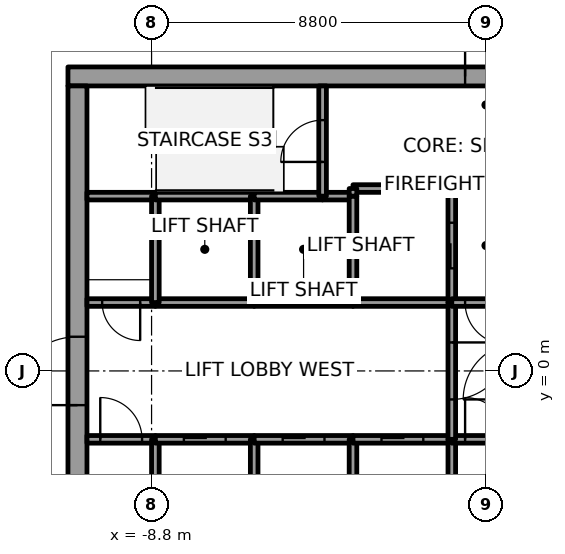
"""IFC4 building model, lengths in metres.
Left out: names, types, materials, properties, quantities, classifications, styles, units other than length and angle.
Written with IfcOpenShell. Run it as: python <this file> out.ifc"""

import sys

from ifc_helpers import new_model, si_unit, direction, frame, frame_2d, origin, place, context, subcontext, project, spatial, rectangle, extrude, element, fill, save


model = new_model("IFC4")
c1 = context("Model", 3, precision=1e-05, world=origin(), true_north=direction((0.0, 1.0)))
c2 = subcontext(c1, "Body", "Model", "MODEL_VIEW")
j1 = project(units=[si_unit("LENGTHUNIT", "METRE"), si_unit("PLANEANGLEUNIT", "RADIAN")], contexts=[c1])
p1 = place(None, origin())
s1 = spatial("IfcSite", under=j1, at=p1, CompositionType="ELEMENT")
p2 = place(p1, origin())
s2 = spatial("IfcBuilding", under=s1, at=p2, CompositionType="ELEMENT")
p3 = place(p2, frame((0.0, 0.0, 161.8)))
s3 = spatial("IfcBuildingStorey", under=s2, at=p3, CompositionType="ELEMENT", Elevation=161.8)
p4 = place(p3, frame((-11.0, 7.75, 0.0), z_axis=(0.0, 0.0, 1.0), x_axis=(1.0, 0.0, 0.0)))
e1 = element("IfcWall", 1, at=p4, inside=s3, PredefinedType="SHEAR", context=c2, shape_type="SweptSolid", body=[
    extrude(rectangle(XDim=22.0, YDim=0.5, at=frame_2d((11.0, 0.0))), origin(), (0.0, 0.0, 1.0), 4.0),
])
p5 = place(p4, frame((10.45, 0.0, 0.0)))
e2 = element("IfcOpeningElement", 2, at=p5, cuts=e1, PredefinedType="OPENING", context=c2, shape_type="SweptSolid", body=[
    extrude(rectangle(XDim=1.1, YDim=2.1, at=frame_2d((0.55, 1.05))), frame((0.0, 0.25, 0.0), z_axis=(0.0, -1.0, 0.0), x_axis=(1.0, 0.0, 0.0)), (0.0, 0.0, 1.0), 0.5),
])
p6 = place(p3, frame((-10.75, -7.5, 0.0), z_axis=(0.0, 0.0, 1.0), x_axis=(0.0, 1.0, 0.0)))
e3 = element("IfcWall", 3, at=p6, inside=s3, PredefinedType="SHEAR", context=c2, shape_type="SweptSolid", body=[
    extrude(rectangle(XDim=15.0, YDim=0.5, at=frame_2d((7.5, 0.0))), origin(), (0.0, 0.0, 1.0), 4.0),
])
p7 = place(p6, frame((6.6, 0.0, 0.0)))
e4 = element("IfcOpeningElement", 4, at=p7, cuts=e3, PredefinedType="OPENING", context=c2, shape_type="SweptSolid", body=[
    extrude(rectangle(XDim=1.8, YDim=2.1, at=frame_2d((0.9, 1.05))), frame((0.0, 0.25, 0.0), z_axis=(0.0, -1.0, 0.0), x_axis=(1.0, 0.0, 0.0)), (0.0, 0.0, 1.0), 0.5),
])
p8 = place(p3, frame((-10.5, -1.8, 0.0), z_axis=(0.0, 0.0, 1.0), x_axis=(1.0, 0.0, 0.0)))
e5 = element("IfcWall", 5, at=p8, inside=s3, PredefinedType="SOLIDWALL", context=c2, shape_type="SweptSolid", body=[
    extrude(rectangle(XDim=1.8, YDim=0.2, at=frame_2d((0.9, 0.0))), origin(), (0.0, 0.0, 1.0), 3.85),
])
p9 = place(p8, frame((0.35, 0.0, 0.0)))
e6 = element("IfcOpeningElement", 6, at=p9, cuts=e5, PredefinedType="OPENING", context=c2, shape_type="SweptSolid", body=[
    extrude(rectangle(XDim=1.1, YDim=2.1, at=frame_2d((0.55, 1.05))), frame((0.0, 0.1, 0.0), z_axis=(0.0, -1.0, 0.0), x_axis=(1.0, 0.0, 0.0)), (0.0, 0.0, 1.0), 0.2),
])
p10 = place(p3, frame((-8.7, 1.8, 0.0), z_axis=(0.0, 0.0, 1.0), x_axis=(-1.0, 0.0, 0.0)))
e7 = element("IfcWall", 7, at=p10, inside=s3, PredefinedType="SOLIDWALL", context=c2, shape_type="SweptSolid", body=[
    extrude(rectangle(XDim=1.8, YDim=0.2, at=frame_2d((0.9, 0.0))), origin(), (0.0, 0.0, 1.0), 3.85),
])
p11 = place(p10, frame((0.4, 0.0, 0.0)))
e8 = element("IfcOpeningElement", 8, at=p11, cuts=e7, PredefinedType="OPENING", context=c2, shape_type="SweptSolid", body=[
    extrude(rectangle(XDim=1.0, YDim=2.1, at=frame_2d((0.5, 1.05))), frame((0.0, 0.1, 0.0), z_axis=(0.0, -1.0, 0.0), x_axis=(1.0, 0.0, 0.0)), (0.0, 0.0, 1.0), 0.2),
])
p12 = place(p3, frame((-8.7, 4.6, 0.0), z_axis=(0.0, 0.0, 1.0), x_axis=(-1.0, 0.0, 0.0)))
e9 = element("IfcWall", 9, at=p12, inside=s3, PredefinedType="SOLIDWALL", context=c2, shape_type="SweptSolid", body=[
    extrude(rectangle(XDim=1.8, YDim=0.2, at=frame_2d((0.9, 0.0))), origin(), (0.0, 0.0, 1.0), 3.85),
])
p13 = place(p3, frame((-8.7, -4.6, 0.0), z_axis=(0.0, 0.0, 1.0), x_axis=(0.0, 1.0, 0.0)))
e10 = element("IfcWall", 10, at=p13, inside=s3, PredefinedType="SOLIDWALL", context=c2, shape_type="SweptSolid", body=[
    extrude(rectangle(XDim=2.8, YDim=0.2, at=frame_2d((1.4, 0.0))), origin(), (0.0, 0.0, 1.0), 3.85),
])
p14 = place(p3, frame((-8.7, -1.8, 0.0), z_axis=(0.0, 0.0, 1.0), x_axis=(1.0, 0.0, 0.0)))
e11 = element("IfcWall", 11, at=p14, inside=s3, PredefinedType="SOLIDWALL", context=c2, shape_type="SweptSolid", body=[
    extrude(rectangle(XDim=2.6, YDim=0.2, at=frame_2d((1.3, 0.0))), origin(), (0.0, 0.0, 1.0), 3.85),
])
p15 = place(p14, frame((0.75, 0.0, 0.0)))
e12 = element("IfcOpeningElement", 12, at=p15, cuts=e11, PredefinedType="OPENING", context=c2, shape_type="SweptSolid", body=[
    extrude(rectangle(XDim=1.1, YDim=2.1, at=frame_2d((0.55, 1.05))), frame((0.0, 0.1, 0.0), z_axis=(0.0, -1.0, 0.0), x_axis=(1.0, 0.0, 0.0)), (0.0, 0.0, 1.0), 0.2),
])
p16 = place(p3, frame((-6.1, 1.8, 0.0), z_axis=(0.0, 0.0, 1.0), x_axis=(-1.0, 0.0, 0.0)))
e13 = element("IfcWall", 13, at=p16, inside=s3, PredefinedType="SOLIDWALL", context=c2, shape_type="SweptSolid", body=[
    extrude(rectangle(XDim=2.6, YDim=0.2, at=frame_2d((1.3, 0.0))), origin(), (0.0, 0.0, 1.0), 3.85),
])
p17 = place(p3, frame((-8.7, 1.8, 0.0), z_axis=(0.0, 0.0, 1.0), x_axis=(0.0, 1.0, 0.0)))
e14 = element("IfcWall", 14, at=p17, inside=s3, PredefinedType="SOLIDWALL", context=c2, shape_type="SweptSolid", body=[
    extrude(rectangle(XDim=2.8, YDim=0.2, at=frame_2d((1.4, 0.0))), origin(), (0.0, 0.0, 1.0), 3.85),
])
p18 = place(p3, frame((-6.1, 4.6, 0.0), z_axis=(0.0, 0.0, 1.0), x_axis=(-1.0, 0.0, 0.0)))
e15 = element("IfcWall", 15, at=p18, inside=s3, PredefinedType="SOLIDWALL", context=c2, shape_type="SweptSolid", body=[
    extrude(rectangle(XDim=2.6, YDim=0.2, at=frame_2d((1.3, 0.0))), origin(), (0.0, 0.0, 1.0), 3.85),
])
p19 = place(p3, frame((-6.1, -4.6, 0.0), z_axis=(0.0, 0.0, 1.0), x_axis=(0.0, 1.0, 0.0)))
e16 = element("IfcWall", 16, at=p19, inside=s3, PredefinedType="SOLIDWALL", context=c2, shape_type="SweptSolid", body=[
    extrude(rectangle(XDim=2.8, YDim=0.2, at=frame_2d((1.4, 0.0))), origin(), (0.0, 0.0, 1.0), 3.85),
])
p20 = place(p3, frame((-6.1, -1.8, 0.0), z_axis=(0.0, 0.0, 1.0), x_axis=(1.0, 0.0, 0.0)))
e17 = element("IfcWall", 17, at=p20, inside=s3, PredefinedType="SOLIDWALL", context=c2, shape_type="SweptSolid", body=[
    extrude(rectangle(XDim=2.6, YDim=0.2, at=frame_2d((1.3, 0.0))), origin(), (0.0, 0.0, 1.0), 3.85),
])
p21 = place(p20, frame((0.75, 0.0, 0.0)))
e18 = element("IfcOpeningElement", 18, at=p21, cuts=e17, PredefinedType="OPENING", context=c2, shape_type="SweptSolid", body=[
    extrude(rectangle(XDim=1.1, YDim=2.1, at=frame_2d((0.55, 1.05))), frame((0.0, 0.1, 0.0), z_axis=(0.0, -1.0, 0.0), x_axis=(1.0, 0.0, 0.0)), (0.0, 0.0, 1.0), 0.2),
])
p22 = place(p3, frame((-3.5, 1.8, 0.0), z_axis=(0.0, 0.0, 1.0), x_axis=(-1.0, 0.0, 0.0)))
e19 = element("IfcWall", 19, at=p22, inside=s3, PredefinedType="SOLIDWALL", context=c2, shape_type="SweptSolid", body=[
    extrude(rectangle(XDim=2.6, YDim=0.2, at=frame_2d((1.3, 0.0))), origin(), (0.0, 0.0, 1.0), 3.85),
])
p23 = place(p3, frame((-6.1, 1.8, 0.0), z_axis=(0.0, 0.0, 1.0), x_axis=(0.0, 1.0, 0.0)))
e20 = element("IfcWall", 20, at=p23, inside=s3, PredefinedType="SOLIDWALL", context=c2, shape_type="SweptSolid", body=[
    extrude(rectangle(XDim=2.8, YDim=0.2, at=frame_2d((1.4, 0.0))), origin(), (0.0, 0.0, 1.0), 3.85),
])
p24 = place(p3, frame((-4.3, 4.6, 0.0), z_axis=(0.0, 0.0, 1.0), x_axis=(-1.0, 0.0, 0.0)))
e21 = element("IfcWall", 21, at=p24, inside=s3, PredefinedType="SOLIDWALL", context=c2, shape_type="SweptSolid", body=[
    extrude(rectangle(XDim=1.8, YDim=0.2, at=frame_2d((0.9, 0.0))), origin(), (0.0, 0.0, 1.0), 3.85),
])
p25 = place(p3, frame((-3.5, 4.6, 0.0), z_axis=(0.0, 0.0, 1.0), x_axis=(-1.0, 0.0, 0.0)))
e22 = element("IfcWall", 22, at=p25, inside=s3, PredefinedType="SOLIDWALL", context=c2, shape_type="SweptSolid", body=[
    extrude(rectangle(XDim=0.8, YDim=0.2, at=frame_2d((0.4, 0.0))), origin(), (0.0, 0.0, 1.0), 3.85),
])
p26 = place(p3, frame((-4.3, 4.6, 0.0), z_axis=(0.0, 0.0, 1.0), x_axis=(0.0, 1.0, 0.0)))
e23 = element("IfcWall", 23, at=p26, inside=s3, PredefinedType="SOLIDWALL", context=c2, shape_type="SweptSolid", body=[
    extrude(rectangle(XDim=2.9, YDim=0.2, at=frame_2d((1.45, 0.0))), origin(), (0.0, 0.0, 1.0), 3.85),
])
p27 = place(p26, frame((0.9, 0.0, 0.0)))
e24 = element("IfcOpeningElement", 24, at=p27, cuts=e23, PredefinedType="OPENING", context=c2, shape_type="SweptSolid", body=[
    extrude(rectangle(XDim=1.1, YDim=2.1, at=frame_2d((0.55, 1.05))), frame((0.0, 0.1, 0.0), z_axis=(0.0, -1.0, 0.0), x_axis=(1.0, 0.0, 0.0)), (0.0, 0.0, 1.0), 0.2),
])
p28 = place(p3, frame((-3.5, -4.6, 0.0), z_axis=(0.0, 0.0, 1.0), x_axis=(0.0, 1.0, 0.0)))
e25 = element("IfcWall", 25, at=p28, inside=s3, PredefinedType="SOLIDWALL", context=c2, shape_type="SweptSolid", body=[
    extrude(rectangle(XDim=2.8, YDim=0.2, at=frame_2d((1.4, 0.0))), origin(), (0.0, 0.0, 1.0), 3.85),
])
p29 = place(p3, frame((-3.5, -1.8, 0.0), z_axis=(0.0, 0.0, 1.0), x_axis=(1.0, 0.0, 0.0)))
e26 = element("IfcWall", 26, at=p29, inside=s3, PredefinedType="SOLIDWALL", context=c2, shape_type="SweptSolid", body=[
    extrude(rectangle(XDim=2.6, YDim=0.2, at=frame_2d((1.3, 0.0))), origin(), (0.0, 0.0, 1.0), 3.85),
])
p30 = place(p29, frame((0.75, 0.0, 0.0)))
e27 = element("IfcOpeningElement", 27, at=p30, cuts=e26, PredefinedType="OPENING", context=c2, shape_type="SweptSolid", body=[
    extrude(rectangle(XDim=1.1, YDim=2.1, at=frame_2d((0.55, 1.05))), frame((0.0, 0.1, 0.0), z_axis=(0.0, -1.0, 0.0), x_axis=(1.0, 0.0, 0.0)), (0.0, 0.0, 1.0), 0.2),
])
p31 = place(p3, frame((-0.9, 1.8, 0.0), z_axis=(0.0, 0.0, 1.0), x_axis=(-1.0, 0.0, 0.0)))
e28 = element("IfcWall", 28, at=p31, inside=s3, PredefinedType="SOLIDWALL", context=c2, shape_type="SweptSolid", body=[
    extrude(rectangle(XDim=2.6, YDim=0.2, at=frame_2d((1.3, 0.0))), origin(), (0.0, 0.0, 1.0), 3.85),
])
p32 = place(p3, frame((-3.5, 4.6, 0.0), z_axis=(0.0, 0.0, 1.0), x_axis=(0.0, -1.0, 0.0)))
e29 = element("IfcWall", 29, at=p32, inside=s3, PredefinedType="SOLIDWALL", context=c2, shape_type="SweptSolid", body=[
    extrude(rectangle(XDim=2.8, YDim=0.2, at=frame_2d((1.4, 0.0))), origin(), (0.0, 0.0, 1.0), 3.85),
])
p33 = place(p3, frame((-0.9, 1.8, 0.0), z_axis=(0.0, 0.0, 1.0), x_axis=(0.0, 1.0, 0.0)))
e30 = element("IfcWall", 30, at=p33, inside=s3, PredefinedType="SOLIDWALL", context=c2, shape_type="SweptSolid", body=[
    extrude(rectangle(XDim=3.0, YDim=0.2, at=frame_2d((1.5, 0.0))), origin(), (0.0, 0.0, 1.0), 3.85),
])
p34 = place(p33, frame((0.9, 0.0, 0.0)))
e31 = element("IfcOpeningElement", 31, at=p34, cuts=e30, PredefinedType="OPENING", context=c2, shape_type="SweptSolid", body=[
    extrude(rectangle(XDim=1.2, YDim=2.1, at=frame_2d((0.6, 1.05))), frame((0.0, 0.1, 0.0), z_axis=(0.0, -1.0, 0.0), x_axis=(1.0, 0.0, 0.0)), (0.0, 0.0, 1.0), 0.2),
])
p35 = place(p3, frame((-0.9, 4.8, 0.0), z_axis=(0.0, 0.0, 1.0), x_axis=(-1.0, 0.0, 0.0)))
e32 = element("IfcWall", 32, at=p35, inside=s3, PredefinedType="SOLIDWALL", context=c2, shape_type="SweptSolid", body=[
    extrude(rectangle(XDim=2.6, YDim=0.2, at=frame_2d((1.3, 0.0))), origin(), (0.0, 0.0, 1.0), 3.85),
])
p36 = place(p3, frame((-3.5, 4.8, 0.0), z_axis=(0.0, 0.0, 1.0), x_axis=(0.0, -1.0, 0.0)))
e33 = element("IfcWall", 33, at=p36, inside=s3, PredefinedType="SOLIDWALL", context=c2, shape_type="SweptSolid", body=[
    extrude(rectangle(XDim=0.2, YDim=0.2, at=frame_2d((0.1, 0.0))), origin(), (0.0, 0.0, 1.0), 3.85),
])
p37 = place(p3, frame((-0.9, -4.6, 0.0), z_axis=(0.0, 0.0, 1.0), x_axis=(0.0, 1.0, 0.0)))
e34 = element("IfcWall", 34, at=p37, inside=s3, PredefinedType="SOLIDWALL", context=c2, shape_type="SweptSolid", body=[
    extrude(rectangle(XDim=2.8, YDim=0.2, at=frame_2d((1.4, 0.0))), origin(), (0.0, 0.0, 1.0), 3.85),
])
p38 = place(p3, frame((-0.9, -1.8, 0.0), z_axis=(0.0, 0.0, 1.0), x_axis=(1.0, 0.0, 0.0)))
e35 = element("IfcWall", 35, at=p38, inside=s3, PredefinedType="SOLIDWALL", context=c2, shape_type="SweptSolid", body=[
    extrude(rectangle(XDim=1.8, YDim=0.2, at=frame_2d((0.9, 0.0))), origin(), (0.0, 0.0, 1.0), 3.85),
])
p39 = place(p38, frame((0.35, 0.0, 0.0)))
e36 = element("IfcOpeningElement", 36, at=p39, cuts=e35, PredefinedType="OPENING", context=c2, shape_type="SweptSolid", body=[
    extrude(rectangle(XDim=1.1, YDim=2.1, at=frame_2d((0.55, 1.05))), frame((0.0, 0.1, 0.0), z_axis=(0.0, -1.0, 0.0), x_axis=(1.0, 0.0, 0.0)), (0.0, 0.0, 1.0), 0.2),
])
p40 = place(p3, frame((-0.9, 1.8, 0.0), z_axis=(0.0, 0.0, 1.0), x_axis=(0.0, -1.0, 0.0)))
e37 = element("IfcWall", 37, at=p40, inside=s3, PredefinedType="SOLIDWALL", context=c2, shape_type="SweptSolid", body=[
    extrude(rectangle(XDim=3.6, YDim=0.2, at=frame_2d((1.8, 0.0))), origin(), (0.0, 0.0, 1.0), 3.85),
])
p41 = place(p40, frame((1.05, 0.0, 0.0)))
e38 = element("IfcOpeningElement", 38, at=p41, cuts=e37, PredefinedType="OPENING", context=c2, shape_type="SweptSolid", body=[
    extrude(rectangle(XDim=1.5, YDim=2.1, at=frame_2d((0.75, 1.05))), frame((0.0, 0.1, 0.0), z_axis=(0.0, -1.0, 0.0), x_axis=(1.0, 0.0, 0.0)), (0.0, 0.0, 1.0), 0.2),
])
p42 = place(p3, frame((0.9, 1.8, 0.0), z_axis=(0.0, 0.0, 1.0), x_axis=(-1.0, 0.0, 0.0)))
e39 = element("IfcWall", 39, at=p42, inside=s3, PredefinedType="SOLIDWALL", context=c2, shape_type="SweptSolid", body=[
    extrude(rectangle(XDim=1.8, YDim=0.2, at=frame_2d((0.9, 0.0))), origin(), (0.0, 0.0, 1.0), 3.85),
])
p43 = place(p42, frame((0.35, 0.0, 0.0)))
e40 = element("IfcOpeningElement", 40, at=p43, cuts=e39, PredefinedType="OPENING", context=c2, shape_type="SweptSolid", body=[
    extrude(rectangle(XDim=1.1, YDim=2.1, at=frame_2d((0.55, 1.05))), frame((0.0, 0.1, 0.0), z_axis=(0.0, -1.0, 0.0), x_axis=(1.0, 0.0, 0.0)), (0.0, 0.0, 1.0), 0.2),
])
p44 = place(p15, origin())
e41 = element("IfcDoor", 41, at=p44, inside=s3, OperationType="SLIDING_TO_RIGHT", PredefinedType="DOOR", context=c2, shape_type="SweptSolid", body=[
    extrude(rectangle(XDim=1.1, YDim=2.1, at=frame_2d((0.55, 1.05))), frame((0.0, 0.025, 0.0), z_axis=(0.0, -1.0, 0.0), x_axis=(1.0, 0.0, 0.0)), (0.0, 0.0, 1.0), 0.05),
])
fill(e12, e41)
p45 = place(p21, origin())
e42 = element("IfcDoor", 42, at=p45, inside=s3, OperationType="SLIDING_TO_LEFT", PredefinedType="DOOR", context=c2, shape_type="SweptSolid", body=[
    extrude(rectangle(XDim=1.1, YDim=2.1, at=frame_2d((0.55, 1.05))), frame((0.0, 0.025, 0.0), z_axis=(0.0, -1.0, 0.0), x_axis=(1.0, 0.0, 0.0)), (0.0, 0.0, 1.0), 0.05),
])
fill(e18, e42)
p46 = place(p30, origin())
e43 = element("IfcDoor", 43, at=p46, inside=s3, OperationType="SLIDING_TO_RIGHT", PredefinedType="DOOR", context=c2, shape_type="SweptSolid", body=[
    extrude(rectangle(XDim=1.1, YDim=2.1, at=frame_2d((0.55, 1.05))), frame((0.0, 0.025, 0.0), z_axis=(0.0, -1.0, 0.0), x_axis=(1.0, 0.0, 0.0)), (0.0, 0.0, 1.0), 0.05),
])
fill(e27, e43)
p47 = place(p34, origin())
e44 = element("IfcDoor", 44, at=p47, inside=s3, OperationType="SLIDING_TO_RIGHT", PredefinedType="DOOR", context=c2, shape_type="SweptSolid", body=[
    extrude(rectangle(XDim=1.2, YDim=2.1, at=frame_2d((0.6, 1.05))), frame((0.0, 0.025, 0.0), z_axis=(0.0, -1.0, 0.0), x_axis=(1.0, 0.0, 0.0)), (0.0, 0.0, 1.0), 0.05),
])
fill(e31, e44)
p48 = place(p41, origin())
e45 = element("IfcDoor", 45, at=p48, inside=s3, OperationType="DOUBLE_DOOR_SINGLE_SWING", PredefinedType="DOOR", context=c2, shape_type="SweptSolid", body=[
    extrude(rectangle(XDim=1.5, YDim=2.1, at=frame_2d((0.75, 1.05))), frame((0.0, 0.025, 0.0), z_axis=(0.0, -1.0, 0.0), x_axis=(1.0, 0.0, 0.0)), (0.0, 0.0, 1.0), 0.05),
])
fill(e38, e45)
p49 = place(p9, origin())
e46 = element("IfcDoor", 46, at=p49, inside=s3, OperationType="SINGLE_SWING_RIGHT", PredefinedType="DOOR", context=c2, shape_type="SweptSolid", body=[
    extrude(rectangle(XDim=1.1, YDim=2.1, at=frame_2d((0.55, 1.05))), frame((0.0, 0.025, 0.0), z_axis=(0.0, -1.0, 0.0), x_axis=(1.0, 0.0, 0.0)), (0.0, 0.0, 1.0), 0.05),
])
fill(e6, e46)
p50 = place(p43, origin())
e47 = element("IfcDoor", 47, at=p50, inside=s3, OperationType="SINGLE_SWING_LEFT", PredefinedType="DOOR", context=c2, shape_type="SweptSolid", body=[
    extrude(rectangle(XDim=1.1, YDim=2.1, at=frame_2d((0.55, 1.05))), frame((0.0, 0.025, 0.0), z_axis=(0.0, -1.0, 0.0), x_axis=(1.0, 0.0, 0.0)), (0.0, 0.0, 1.0), 0.05),
])
fill(e40, e47)
p51 = place(p39, origin())
e48 = element("IfcDoor", 48, at=p51, inside=s3, OperationType="SINGLE_SWING_LEFT", PredefinedType="DOOR", context=c2, shape_type="SweptSolid", body=[
    extrude(rectangle(XDim=1.1, YDim=2.1, at=frame_2d((0.55, 1.05))), frame((0.0, 0.025, 0.0), z_axis=(0.0, -1.0, 0.0), x_axis=(1.0, 0.0, 0.0)), (0.0, 0.0, 1.0), 0.05),
])
fill(e36, e48)
p52 = place(p11, origin())
e49 = element("IfcDoor", 49, at=p52, inside=s3, OperationType="SINGLE_SWING_RIGHT", PredefinedType="DOOR", context=c2, shape_type="SweptSolid", body=[
    extrude(rectangle(XDim=1.0, YDim=2.1, at=frame_2d((0.5, 1.05))), frame((0.0, 0.025, 0.0), z_axis=(0.0, -1.0, 0.0), x_axis=(1.0, 0.0, 0.0)), (0.0, 0.0, 1.0), 0.05),
])
fill(e8, e49)
p53 = place(p27, origin())
e50 = element("IfcDoor", 50, at=p53, inside=s3, OperationType="SINGLE_SWING_RIGHT", PredefinedType="DOOR", context=c2, shape_type="SweptSolid", body=[
    extrude(rectangle(XDim=1.1, YDim=2.1, at=frame_2d((0.55, 1.05))), frame((0.0, 0.025, 0.0), z_axis=(0.0, -1.0, 0.0), x_axis=(1.0, 0.0, 0.0)), (0.0, 0.0, 1.0), 0.05),
])
fill(e24, e50)
p54 = place(p7, origin())
e51 = element("IfcDoor", 51, at=p54, inside=s3, OperationType="DOUBLE_DOOR_SINGLE_SWING", PredefinedType="DOOR", context=c2, shape_type="SweptSolid", body=[
    extrude(rectangle(XDim=1.8, YDim=2.1, at=frame_2d((0.9, 1.05))), frame((0.0, 0.025, 0.0), z_axis=(0.0, -1.0, 0.0), x_axis=(1.0, 0.0, 0.0)), (0.0, 0.0, 1.0), 0.05),
])
fill(e4, e51)
p55 = place(p5, origin())
e52 = element("IfcDoor", 52, at=p55, inside=s3, OperationType="SINGLE_SWING_LEFT", PredefinedType="DOOR", context=c2, shape_type="SweptSolid", body=[
    extrude(rectangle(XDim=1.1, YDim=2.1, at=frame_2d((0.55, 1.05))), frame((0.0, 0.025, 0.0), z_axis=(0.0, -1.0, 0.0), x_axis=(1.0, 0.0, 0.0)), (0.0, 0.0, 1.0), 0.05),
])
fill(e2, e52)
save(model, sys.argv[1])
